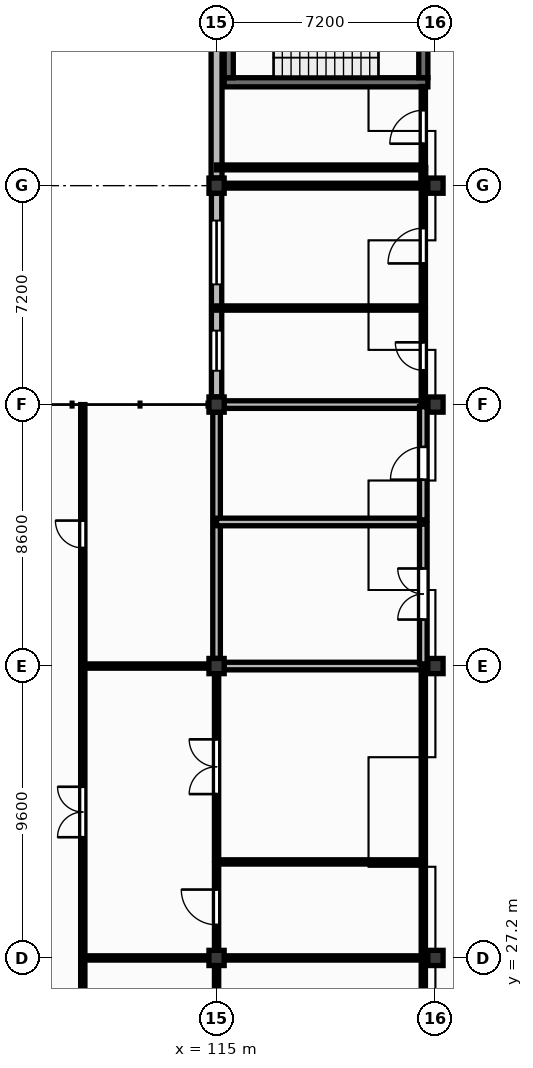
"""IFC4 building model, lengths in metres.
Left out: names, types, materials, properties, quantities, classifications, styles, units other than length and angle.
Written with IfcOpenShell. Run it as: python <this file> out.ifc"""

import sys

from ifc_helpers import new_model, si_unit, direction, frame, frame_2d, origin, origin_2d, place, context, subcontext, project, spatial, rectangle, extrude, element, fill, save


model = new_model("IFC4")
c1 = context("Model", 3, precision=1e-05, world=origin(), true_north=direction((0.0, 1.0)))
c2 = subcontext(c1, "Body", "Model", "MODEL_VIEW")
j1 = project(units=[si_unit("LENGTHUNIT", "METRE"), si_unit("PLANEANGLEUNIT", "RADIAN")], contexts=[c1])
p1 = place(None, origin())
s1 = spatial("IfcSite", under=j1, at=p1, CompositionType="ELEMENT")
p2 = place(p1, origin())
s2 = spatial("IfcBuilding", under=s1, at=p2, CompositionType="ELEMENT")
p3 = place(p2, frame((0.0, 0.0, 4.5)))
s3 = spatial("IfcBuildingStorey", under=s2, at=p3, CompositionType="ELEMENT", Elevation=4.5)
for number, where, z_axis, x_axis in (
    (1, (115.0, 27.2, 0.0), (0.0, 0.0, 1.0), (1.0, 0.0, 0.0)),
    (2, (115.0, 36.8, 0.0), (0.0, 0.0, 1.0), (1.0, 0.0, 0.0)),
    (3, (115.0, 45.4, 0.0), (0.0, 0.0, 1.0), (1.0, 0.0, 0.0)),
    (4, (115.0, 52.6, 0.0), (0.0, 0.0, 1.0), (1.0, 0.0, 0.0)),
    (5, (122.2, 27.2, 0.0), (0.0, 0.0, 1.0), (1.0, 0.0, 0.0)),
    (6, (122.2, 36.8, 0.0), (0.0, 0.0, 1.0), (1.0, 0.0, 0.0)),
    (7, (122.2, 45.4, 0.0), (0.0, 0.0, 1.0), (1.0, 0.0, 0.0)),
    (8, (122.2, 52.6, 0.0), (0.0, 0.0, 1.0), (1.0, 0.0, 0.0)),
):
    element("IfcColumn", number, at=place(p3, frame(where, z_axis=z_axis, x_axis=x_axis)), inside=s3, PredefinedType="COLUMN", context=c2, shape_type="SweptSolid", body=[
        extrude(rectangle(XDim=0.5, YDim=0.5, at=origin_2d()), origin(), (0.0, 0.0, 1.0), 4.22),
    ])
p4 = place(p3, frame((115.0, 45.65, 0.0), z_axis=(0.0, 0.0, 1.0), x_axis=(0.0, 1.0, 0.0)))
e9 = element("IfcWall", 9, at=p4, inside=s3, PredefinedType="SOLIDWALL", context=c2, shape_type="SweptSolid", body=[
    extrude(rectangle(XDim=6.7, YDim=0.34, at=frame_2d((3.35, 0.0))), origin(), (0.0, 0.0, 1.0), 3.52),
])
p5 = place(p4, frame((0.863, 0.0, 1.5)))
e10 = element("IfcOpeningElement", 10, at=p5, cuts=e9, PredefinedType="OPENING", context=c2, shape_type="SweptSolid", body=[
    extrude(rectangle(XDim=1.32, YDim=1.25, at=frame_2d((0.66, 0.625))), frame((0.0, 0.18, 0.0), z_axis=(0.0, -1.0, 0.0), x_axis=(1.0, 0.0, 0.0)), (0.0, 0.0, 1.0), 0.36),
])
p6 = place(p4, frame((3.703, 0.0, 1.05)))
e11 = element("IfcOpeningElement", 11, at=p6, cuts=e9, PredefinedType="OPENING", context=c2, shape_type="SweptSolid", body=[
    extrude(rectangle(XDim=2.1, YDim=1.65, at=frame_2d((1.05, 0.825))), frame((0.0, 0.18, 0.0), z_axis=(0.0, -1.0, 0.0), x_axis=(1.0, 0.0, 0.0)), (0.0, 0.0, 1.0), 0.36),
])
p7 = place(p3, frame((115.0, 52.85, 0.0), z_axis=(0.0, 0.0, 1.0), x_axis=(0.0, 1.0, 0.0)))
e12 = element("IfcWall", 12, at=p7, inside=s3, PredefinedType="SOLIDWALL", context=c2, shape_type="SweptSolid", body=[
    extrude(rectangle(XDim=6.7, YDim=0.36, at=frame_2d((3.35, 0.0))), origin(), (0.0, 0.0, 1.0), 3.52),
])
p8 = place(p3, frame((115.25, 56.0, 0.0), z_axis=(0.0, 0.0, 1.0), x_axis=(1.0, 0.0, 0.0)))
e13 = element("IfcWall", 13, at=p8, inside=s3, PredefinedType="SHEAR", context=c2, shape_type="SweptSolid", body=[
    extrude(rectangle(XDim=6.7, YDim=0.3, at=frame_2d((3.35, 0.0))), origin(), (0.0, 0.0, 1.0), 4.25),
])
p9 = place(p3, frame((115.4, 56.15, 0.0), z_axis=(0.0, 0.0, 1.0), x_axis=(0.0, 1.0, 0.0)))
e14 = element("IfcWall", 14, at=p9, inside=s3, PredefinedType="SHEAR", context=c2, shape_type="SweptSolid", body=[
    extrude(rectangle(XDim=2.9, YDim=0.3, at=frame_2d((1.45, 0.0))), origin(), (0.0, 0.0, 1.0), 4.25),
])
p10 = place(p3, frame((121.8, 56.15, 0.0), z_axis=(0.0, 0.0, 1.0), x_axis=(0.0, 1.0, 0.0)))
e15 = element("IfcWall", 15, at=p10, inside=s3, PredefinedType="SHEAR", context=c2, shape_type="SweptSolid", body=[
    extrude(rectangle(XDim=2.9, YDim=0.3, at=frame_2d((1.45, 0.0))), origin(), (0.0, 0.0, 1.0), 4.25),
])
p11 = place(p10, frame((0.89, 0.0, 0.0)))
e16 = element("IfcOpeningElement", 16, at=p11, cuts=e15, PredefinedType="OPENING", context=c2, shape_type="SweptSolid", body=[
    extrude(rectangle(XDim=1.12, YDim=2.1, at=frame_2d((0.56, 1.05))), frame((0.0, 0.16, 0.0), z_axis=(0.0, -1.0, 0.0), x_axis=(1.0, 0.0, 0.0)), (0.0, 0.0, 1.0), 0.32),
])
p12 = place(p3, frame((110.6, 18.67, 0.0), z_axis=(0.0, 0.0, 1.0), x_axis=(0.0, 1.0, 0.0)))
e17 = element("IfcWall", 17, at=p12, inside=s3, PredefinedType="PARTITIONING", context=c2, shape_type="SweptSolid", body=[
    extrude(rectangle(XDim=8.46, YDim=0.14, at=frame_2d((4.23, 0.0))), origin(), (0.0, 0.0, 1.0), 4.18),
])
p13 = place(p12, frame((3.4, 0.0, 0.0)))
e18 = element("IfcOpeningElement", 18, at=p13, cuts=e17, PredefinedType="OPENING", context=c2, shape_type="SweptSolid", body=[
    extrude(rectangle(XDim=1.66, YDim=2.3, at=frame_2d((0.83, 1.15))), frame((0.0, 0.08, 0.0), z_axis=(0.0, -1.0, 0.0), x_axis=(1.0, 0.0, 0.0)), (0.0, 0.0, 1.0), 0.16),
])
p14 = place(p3, frame((110.6, 27.27, 0.0), z_axis=(0.0, 0.0, 1.0), x_axis=(0.0, 1.0, 0.0)))
e19 = element("IfcWall", 19, at=p14, inside=s3, PredefinedType="PARTITIONING", context=c2, shape_type="SweptSolid", body=[
    extrude(rectangle(XDim=9.46, YDim=0.14, at=frame_2d((4.73, 0.0))), origin(), (0.0, 0.0, 1.0), 4.18),
])
p15 = place(p14, frame((3.9, 0.0, 0.0)))
e20 = element("IfcOpeningElement", 20, at=p15, cuts=e19, PredefinedType="OPENING", context=c2, shape_type="SweptSolid", body=[
    extrude(rectangle(XDim=1.66, YDim=2.3, at=frame_2d((0.83, 1.15))), frame((0.0, 0.08, 0.0), z_axis=(0.0, -1.0, 0.0), x_axis=(1.0, 0.0, 0.0)), (0.0, 0.0, 1.0), 0.16),
])
p16 = place(p3, frame((110.6, 27.2, 0.0), z_axis=(0.0, 0.0, 1.0), x_axis=(1.0, 0.0, 0.0)))
e21 = element("IfcWall", 21, at=p16, inside=s3, PredefinedType="PARTITIONING", context=c2, shape_type="SweptSolid", body=[
    extrude(rectangle(XDim=4.15, YDim=0.14, at=frame_2d((2.075, 0.0))), origin(), (0.0, 0.0, 1.0), 3.87),
])
p17 = place(p3, frame((110.6, 36.87, 0.0), z_axis=(0.0, 0.0, 1.0), x_axis=(0.0, 1.0, 0.0)))
e22 = element("IfcWall", 22, at=p17, inside=s3, PredefinedType="PARTITIONING", context=c2, shape_type="SweptSolid", body=[
    extrude(rectangle(XDim=8.53, YDim=0.14, at=frame_2d((4.265, 0.0))), origin(), (0.0, 0.0, 1.0), 4.18),
])
p18 = place(p17, frame((3.815, 0.0, 0.0)))
e23 = element("IfcOpeningElement", 23, at=p18, cuts=e22, PredefinedType="OPENING", context=c2, shape_type="SweptSolid", body=[
    extrude(rectangle(XDim=0.9, YDim=2.1, at=frame_2d((0.45, 1.05))), frame((0.0, 0.08, 0.0), z_axis=(0.0, -1.0, 0.0), x_axis=(1.0, 0.0, 0.0)), (0.0, 0.0, 1.0), 0.16),
])
p19 = place(p3, frame((110.6, 36.8, 0.0), z_axis=(0.0, 0.0, 1.0), x_axis=(1.0, 0.0, 0.0)))
e24 = element("IfcWall", 24, at=p19, inside=s3, PredefinedType="PARTITIONING", context=c2, shape_type="SweptSolid", body=[
    extrude(rectangle(XDim=4.15, YDim=0.14, at=frame_2d((2.075, 0.0))), origin(), (0.0, 0.0, 1.0), 3.87),
])
p20 = place(p3, frame((115.0, 24.14, 0.0), z_axis=(0.0, 0.0, 1.0), x_axis=(0.0, 1.0, 0.0)))
e25 = element("IfcWall", 25, at=p20, inside=s3, PredefinedType="PARTITIONING", context=c2, shape_type="SweptSolid", body=[
    extrude(rectangle(XDim=2.81, YDim=0.14, at=frame_2d((1.405, 0.0))), origin(), (0.0, 0.0, 1.0), 3.52),
])
p21 = place(p3, frame((115.0, 27.45, 0.0), z_axis=(0.0, 0.0, 1.0), x_axis=(0.0, 1.0, 0.0)))
e26 = element("IfcWall", 26, at=p21, inside=s3, PredefinedType="PARTITIONING", context=c2, shape_type="SweptSolid", body=[
    extrude(rectangle(XDim=2.838, YDim=0.14, at=frame_2d((1.419, 0.0))), origin(), (0.0, 0.0, 1.0), 3.52),
])
p22 = place(p21, frame((0.839, 0.0, 0.0)))
e27 = element("IfcOpeningElement", 27, at=p22, cuts=e26, PredefinedType="OPENING", context=c2, shape_type="SweptSolid", body=[
    extrude(rectangle(XDim=1.16, YDim=2.1, at=frame_2d((0.58, 1.05))), frame((0.0, 0.08, 0.0), z_axis=(0.0, -1.0, 0.0), x_axis=(1.0, 0.0, 0.0)), (0.0, 0.0, 1.0), 0.16),
])
p23 = place(p3, frame((115.25, 27.2, 0.0), z_axis=(0.0, 0.0, 1.0), x_axis=(1.0, 0.0, 0.0)))
e28 = element("IfcWall", 28, at=p23, inside=s3, PredefinedType="PARTITIONING", context=c2, shape_type="SweptSolid", body=[
    extrude(rectangle(XDim=6.55, YDim=0.14, at=frame_2d((3.275, 0.0))), origin(), (0.0, 0.0, 1.0), 3.52),
])
p24 = place(p3, frame((115.0, 30.428, 0.0), z_axis=(0.0, 0.0, 1.0), x_axis=(0.0, 1.0, 0.0)))
e29 = element("IfcWall", 29, at=p24, inside=s3, PredefinedType="PARTITIONING", context=c2, shape_type="SweptSolid", body=[
    extrude(rectangle(XDim=6.122, YDim=0.14, at=frame_2d((3.061, 0.0))), origin(), (0.0, 0.0, 1.0), 3.52),
])
p25 = place(p24, frame((2.161, 0.0, 0.0)))
e30 = element("IfcOpeningElement", 30, at=p25, cuts=e29, PredefinedType="OPENING", context=c2, shape_type="SweptSolid", body=[
    extrude(rectangle(XDim=1.8, YDim=2.3, at=frame_2d((0.9, 1.15))), frame((0.0, 0.08, 0.0), z_axis=(0.0, -1.0, 0.0), x_axis=(1.0, 0.0, 0.0)), (0.0, 0.0, 1.0), 0.16),
])
p26 = place(p3, frame((115.0, 30.358, 0.0), z_axis=(0.0, 0.0, 1.0), x_axis=(1.0, 0.0, 0.0)))
e31 = element("IfcWall", 31, at=p26, inside=s3, PredefinedType="PARTITIONING", context=c2, shape_type="SweptSolid", body=[
    extrude(rectangle(XDim=6.8, YDim=0.14, at=frame_2d((3.4, 0.0))), origin(), (0.0, 0.0, 1.0), 4.18),
])
p27 = place(p3, frame((115.0, 37.05, 0.0), z_axis=(0.0, 0.0, 1.0), x_axis=(0.0, 1.0, 0.0)))
e32 = element("IfcWall", 32, at=p27, inside=s3, PredefinedType="SOLIDWALL", context=c2, shape_type="SweptSolid", body=[
    extrude(rectangle(XDim=4.419, YDim=0.25, at=frame_2d((2.209, 0.0))), origin(), (0.0, 0.0, 1.0), 3.52),
])
p28 = place(p3, frame((115.25, 36.8, 0.0), z_axis=(0.0, 0.0, 1.0), x_axis=(1.0, 0.0, 0.0)))
e33 = element("IfcWall", 33, at=p28, inside=s3, PredefinedType="SOLIDWALL", context=c2, shape_type="SweptSolid", body=[
    extrude(rectangle(XDim=6.55, YDim=0.25, at=frame_2d((3.275, 0.0))), origin(), (0.0, 0.0, 1.0), 3.52),
])
p29 = place(p3, frame((115.0, 41.609, 0.0), z_axis=(0.0, 0.0, 1.0), x_axis=(0.0, 1.0, 0.0)))
e34 = element("IfcWall", 34, at=p29, inside=s3, PredefinedType="SOLIDWALL", context=c2, shape_type="SweptSolid", body=[
    extrude(rectangle(XDim=3.541, YDim=0.25, at=frame_2d((1.771, 0.0))), origin(), (0.0, 0.0, 1.0), 3.52),
])
p30 = place(p3, frame((115.0, 41.539, 0.0), z_axis=(0.0, 0.0, 1.0), x_axis=(1.0, 0.0, 0.0)))
e35 = element("IfcWall", 35, at=p30, inside=s3, PredefinedType="SOLIDWALL", context=c2, shape_type="SweptSolid", body=[
    extrude(rectangle(XDim=6.8, YDim=0.25, at=frame_2d((3.4, 0.0))), origin(), (0.0, 0.0, 1.0), 4.18),
])
p31 = place(p3, frame((115.25, 45.4, 0.0), z_axis=(0.0, 0.0, 1.0), x_axis=(1.0, 0.0, 0.0)))
e36 = element("IfcWall", 36, at=p31, inside=s3, PredefinedType="SOLIDWALL", context=c2, shape_type="SweptSolid", body=[
    extrude(rectangle(XDim=6.55, YDim=0.25, at=frame_2d((3.275, 0.0))), origin(), (0.0, 0.0, 1.0), 3.52),
])
p32 = place(p3, frame((115.0, 48.575, 0.0), z_axis=(0.0, 0.0, 1.0), x_axis=(1.0, 0.0, 0.0)))
e37 = element("IfcWall", 37, at=p32, inside=s3, PredefinedType="PARTITIONING", context=c2, shape_type="SweptSolid", body=[
    extrude(rectangle(XDim=6.8, YDim=0.14, at=frame_2d((3.4, 0.0))), origin(), (0.0, 0.0, 1.0), 4.18),
])
p33 = place(p3, frame((121.8, 24.14, 0.0), z_axis=(0.0, 0.0, 1.0), x_axis=(0.0, 1.0, 0.0)))
e38 = element("IfcWall", 38, at=p33, inside=s3, PredefinedType="PARTITIONING", context=c2, shape_type="SweptSolid", body=[
    extrude(rectangle(XDim=2.99, YDim=0.14, at=frame_2d((1.495, 0.0))), origin(), (0.0, 0.0, 1.0), 4.18),
])
p34 = place(p33, frame((1.035, 0.0, 0.0)))
e39 = element("IfcOpeningElement", 39, at=p34, cuts=e38, PredefinedType="OPENING", context=c2, shape_type="SweptSolid", body=[
    extrude(rectangle(XDim=0.92, YDim=2.1, at=frame_2d((0.46, 1.05))), frame((0.0, 0.08, 0.0), z_axis=(0.0, -1.0, 0.0), x_axis=(1.0, 0.0, 0.0)), (0.0, 0.0, 1.0), 0.16),
])
p35 = place(p3, frame((121.8, 27.27, 0.0), z_axis=(0.0, 0.0, 1.0), x_axis=(0.0, 1.0, 0.0)))
e40 = element("IfcWall", 40, at=p35, inside=s3, PredefinedType="PARTITIONING", context=c2, shape_type="SweptSolid", body=[
    extrude(rectangle(XDim=3.018, YDim=0.14, at=frame_2d((1.509, 0.0))), origin(), (0.0, 0.0, 1.0), 4.18),
])
p36 = place(p3, frame((121.8, 30.428, 0.0), z_axis=(0.0, 0.0, 1.0), x_axis=(0.0, 1.0, 0.0)))
e41 = element("IfcWall", 41, at=p36, inside=s3, PredefinedType="PARTITIONING", context=c2, shape_type="SweptSolid", body=[
    extrude(rectangle(XDim=6.302, YDim=0.14, at=frame_2d((3.151, 0.0))), origin(), (0.0, 0.0, 1.0), 4.18),
])
p37 = place(p3, frame((121.8, 36.87, 0.0), z_axis=(0.0, 0.0, 1.0), x_axis=(0.0, 1.0, 0.0)))
e42 = element("IfcWall", 42, at=p37, inside=s3, PredefinedType="SOLIDWALL", context=c2, shape_type="SweptSolid", body=[
    extrude(rectangle(XDim=4.599, YDim=0.25, at=frame_2d((2.299, 0.0))), origin(), (0.0, 0.0, 1.0), 4.18),
])
p38 = place(p37, frame((1.459, 0.0, 0.0)))
e43 = element("IfcOpeningElement", 43, at=p38, cuts=e42, PredefinedType="OPENING", context=c2, shape_type="SweptSolid", body=[
    extrude(rectangle(XDim=1.68, YDim=2.3, at=frame_2d((0.84, 1.15))), frame((0.0, 0.135, 0.0), z_axis=(0.0, -1.0, 0.0), x_axis=(1.0, 0.0, 0.0)), (0.0, 0.0, 1.0), 0.27),
])
p39 = place(p3, frame((121.8, 41.609, 0.0), z_axis=(0.0, 0.0, 1.0), x_axis=(0.0, 1.0, 0.0)))
e44 = element("IfcWall", 44, at=p39, inside=s3, PredefinedType="SOLIDWALL", context=c2, shape_type="SweptSolid", body=[
    extrude(rectangle(XDim=3.721, YDim=0.25, at=frame_2d((1.861, 0.0))), origin(), (0.0, 0.0, 1.0), 4.18),
])
p40 = place(p39, frame((1.321, 0.0, 0.0)))
e45 = element("IfcOpeningElement", 45, at=p40, cuts=e44, PredefinedType="OPENING", context=c2, shape_type="SweptSolid", body=[
    extrude(rectangle(XDim=1.08, YDim=2.15, at=frame_2d((0.54, 1.075))), frame((0.0, 0.135, 0.0), z_axis=(0.0, -1.0, 0.0), x_axis=(1.0, 0.0, 0.0)), (0.0, 0.0, 1.0), 0.27),
])
p41 = place(p3, frame((121.8, 45.47, 0.0), z_axis=(0.0, 0.0, 1.0), x_axis=(0.0, 1.0, 0.0)))
e46 = element("IfcWall", 46, at=p41, inside=s3, PredefinedType="PARTITIONING", context=c2, shape_type="SweptSolid", body=[
    extrude(rectangle(XDim=3.035, YDim=0.14, at=frame_2d((1.518, 0.0))), origin(), (0.0, 0.0, 1.0), 4.18),
])
p42 = place(p41, frame((1.058, 0.0, 0.0)))
e47 = element("IfcOpeningElement", 47, at=p42, cuts=e46, PredefinedType="OPENING", context=c2, shape_type="SweptSolid", body=[
    extrude(rectangle(XDim=0.92, YDim=2.1, at=frame_2d((0.46, 1.05))), frame((0.0, 0.08, 0.0), z_axis=(0.0, -1.0, 0.0), x_axis=(1.0, 0.0, 0.0)), (0.0, 0.0, 1.0), 0.16),
])
p43 = place(p3, frame((121.8, 48.645, 0.0), z_axis=(0.0, 0.0, 1.0), x_axis=(0.0, 1.0, 0.0)))
e48 = element("IfcWall", 48, at=p43, inside=s3, PredefinedType="PARTITIONING", context=c2, shape_type="SweptSolid", body=[
    extrude(rectangle(XDim=3.955, YDim=0.14, at=frame_2d((1.978, 0.0))), origin(), (0.0, 0.0, 1.0), 4.18),
])
p44 = place(p43, frame((1.397, 0.0, 0.0)))
e49 = element("IfcOpeningElement", 49, at=p44, cuts=e48, PredefinedType="OPENING", context=c2, shape_type="SweptSolid", body=[
    extrude(rectangle(XDim=1.16, YDim=2.1, at=frame_2d((0.58, 1.05))), frame((0.0, 0.08, 0.0), z_axis=(0.0, -1.0, 0.0), x_axis=(1.0, 0.0, 0.0)), (0.0, 0.0, 1.0), 0.16),
])
p45 = place(p3, frame((121.8, 53.2, 0.0), z_axis=(0.0, 0.0, 1.0), x_axis=(0.0, 1.0, 0.0)))
e50 = element("IfcWall", 50, at=p45, inside=s3, PredefinedType="PARTITIONING", context=c2, shape_type="SweptSolid", body=[
    extrude(rectangle(XDim=2.66, YDim=0.14, at=frame_2d((1.33, 0.0))), origin(), (0.0, 0.0, 1.0), 4.18),
])
p46 = place(p45, frame((0.78, 0.0, 0.0)))
e51 = element("IfcOpeningElement", 51, at=p46, cuts=e50, PredefinedType="OPENING", context=c2, shape_type="SweptSolid", body=[
    extrude(rectangle(XDim=1.1, YDim=2.1, at=frame_2d((0.55, 1.05))), frame((0.0, 0.08, 0.0), z_axis=(0.0, -1.0, 0.0), x_axis=(1.0, 0.0, 0.0)), (0.0, 0.0, 1.0), 0.16),
])
p47 = place(p3, frame((121.8, 52.6, 0.0), z_axis=(0.0, 0.0, 1.0), x_axis=(0.0, 1.0, 0.0)))
e52 = element("IfcWall", 52, at=p47, inside=s3, PredefinedType="PARTITIONING", context=c2, shape_type="SweptSolid", body=[
    extrude(rectangle(XDim=0.6, YDim=0.16, at=frame_2d((0.3, 0.0))), origin(), (0.0, 0.0, 1.0), 4.18),
])
p48 = place(p3, frame((115.0, 53.2, 0.0), z_axis=(0.0, 0.0, 1.0), x_axis=(1.0, 0.0, 0.0)))
e53 = element("IfcWall", 53, at=p48, inside=s3, PredefinedType="PARTITIONING", context=c2, shape_type="SweptSolid", body=[
    extrude(rectangle(XDim=6.8, YDim=0.16, at=frame_2d((3.4, 0.0))), origin(), (0.0, 0.0, 1.0), 4.18),
])
p49 = place(p3, frame((121.8, 52.6, 0.0), z_axis=(0.0, 0.0, 1.0), x_axis=(-1.0, 0.0, 0.0)))
e54 = element("IfcWall", 54, at=p49, inside=s3, PredefinedType="PARTITIONING", context=c2, shape_type="SweptSolid", body=[
    extrude(rectangle(XDim=6.55, YDim=0.16, at=frame_2d((3.275, 0.0))), origin(), (0.0, 0.0, 1.0), 3.52),
])
p50 = place(p5, origin())
e55 = element("IfcWindow", 55, at=p50, inside=s3, PartitioningType="SINGLE_PANEL", PredefinedType="WINDOW", context=c2, shape_type="SweptSolid", body=[
    extrude(rectangle(XDim=1.32, YDim=1.25, at=frame_2d((0.66, 0.625))), frame((0.0, 0.03, 0.0), z_axis=(0.0, -1.0, 0.0), x_axis=(1.0, 0.0, 0.0)), (0.0, 0.0, 1.0), 0.06),
])
fill(e10, e55)
p51 = place(p6, origin())
e56 = element("IfcWindow", 56, at=p51, inside=s3, PartitioningType="DOUBLE_PANEL_VERTICAL", PredefinedType="WINDOW", context=c2, shape_type="SweptSolid", body=[
    extrude(rectangle(XDim=2.1, YDim=1.65, at=frame_2d((1.05, 0.825))), frame((0.0, 0.03, 0.0), z_axis=(0.0, -1.0, 0.0), x_axis=(1.0, 0.0, 0.0)), (0.0, 0.0, 1.0), 0.06),
])
fill(e11, e56)
p52 = place(p46, origin())
e57 = element("IfcDoor", 57, at=p52, inside=s3, OperationType="SINGLE_SWING_LEFT", PredefinedType="DOOR", context=c2, shape_type="SweptSolid", body=[
    extrude(rectangle(XDim=1.1, YDim=2.1, at=frame_2d((0.55, 1.05))), frame((0.0, 0.025, 0.0), z_axis=(0.0, -1.0, 0.0), x_axis=(1.0, 0.0, 0.0)), (0.0, 0.0, 1.0), 0.05),
])
fill(e51, e57)
p53 = place(p15, origin())
e58 = element("IfcDoor", 58, at=p53, inside=s3, OperationType="DOUBLE_DOOR_SINGLE_SWING", PredefinedType="DOOR", context=c2, shape_type="SweptSolid", body=[
    extrude(rectangle(XDim=1.66, YDim=2.3, at=frame_2d((0.83, 1.15))), frame((0.0, 0.025, 0.0), z_axis=(0.0, -1.0, 0.0), x_axis=(1.0, 0.0, 0.0)), (0.0, 0.0, 1.0), 0.05),
])
fill(e20, e58)
p54 = place(p18, origin())
e59 = element("IfcDoor", 59, at=p54, inside=s3, OperationType="SINGLE_SWING_RIGHT", PredefinedType="DOOR", context=c2, shape_type="SweptSolid", body=[
    extrude(rectangle(XDim=0.9, YDim=2.1, at=frame_2d((0.45, 1.05))), frame((0.0, 0.025, 0.0), z_axis=(0.0, -1.0, 0.0), x_axis=(1.0, 0.0, 0.0)), (0.0, 0.0, 1.0), 0.05),
])
fill(e23, e59)
p55 = place(p22, origin())
e60 = element("IfcDoor", 60, at=p55, inside=s3, OperationType="SINGLE_SWING_RIGHT", PredefinedType="DOOR", context=c2, shape_type="SweptSolid", body=[
    extrude(rectangle(XDim=1.16, YDim=2.1, at=frame_2d((0.58, 1.05))), frame((0.0, 0.025, 0.0), z_axis=(0.0, -1.0, 0.0), x_axis=(1.0, 0.0, 0.0)), (0.0, 0.0, 1.0), 0.05),
])
fill(e27, e60)
p56 = place(p25, origin())
e61 = element("IfcDoor", 61, at=p56, inside=s3, OperationType="DOUBLE_DOOR_SINGLE_SWING", PredefinedType="DOOR", context=c2, shape_type="SweptSolid", body=[
    extrude(rectangle(XDim=1.8, YDim=2.3, at=frame_2d((0.9, 1.15))), frame((0.0, 0.025, 0.0), z_axis=(0.0, -1.0, 0.0), x_axis=(1.0, 0.0, 0.0)), (0.0, 0.0, 1.0), 0.05),
])
fill(e30, e61)
p57 = place(p38, origin())
e62 = element("IfcDoor", 62, at=p57, inside=s3, OperationType="DOUBLE_DOOR_SINGLE_SWING", PredefinedType="DOOR", context=c2, shape_type="SweptSolid", body=[
    extrude(rectangle(XDim=1.68, YDim=2.3, at=frame_2d((0.84, 1.15))), frame((0.0, 0.025, 0.0), z_axis=(0.0, -1.0, 0.0), x_axis=(1.0, 0.0, 0.0)), (0.0, 0.0, 1.0), 0.05),
])
fill(e43, e62)
p58 = place(p40, origin())
e63 = element("IfcDoor", 63, at=p58, inside=s3, OperationType="SINGLE_SWING_LEFT", PredefinedType="DOOR", context=c2, shape_type="SweptSolid", body=[
    extrude(rectangle(XDim=1.08, YDim=2.15, at=frame_2d((0.54, 1.075))), frame((0.0, 0.025, 0.0), z_axis=(0.0, -1.0, 0.0), x_axis=(1.0, 0.0, 0.0)), (0.0, 0.0, 1.0), 0.05),
])
fill(e45, e63)
p59 = place(p42, origin())
e64 = element("IfcDoor", 64, at=p59, inside=s3, OperationType="SINGLE_SWING_RIGHT", PredefinedType="DOOR", context=c2, shape_type="SweptSolid", body=[
    extrude(rectangle(XDim=0.92, YDim=2.1, at=frame_2d((0.46, 1.05))), frame((0.0, 0.025, 0.0), z_axis=(0.0, -1.0, 0.0), x_axis=(1.0, 0.0, 0.0)), (0.0, 0.0, 1.0), 0.05),
])
fill(e47, e64)
p60 = place(p44, origin())
e65 = element("IfcDoor", 65, at=p60, inside=s3, OperationType="SINGLE_SWING_LEFT", PredefinedType="DOOR", context=c2, shape_type="SweptSolid", body=[
    extrude(rectangle(XDim=1.16, YDim=2.1, at=frame_2d((0.58, 1.05))), frame((0.0, 0.025, 0.0), z_axis=(0.0, -1.0, 0.0), x_axis=(1.0, 0.0, 0.0)), (0.0, 0.0, 1.0), 0.05),
])
fill(e49, e65)
save(model, sys.argv[1])
